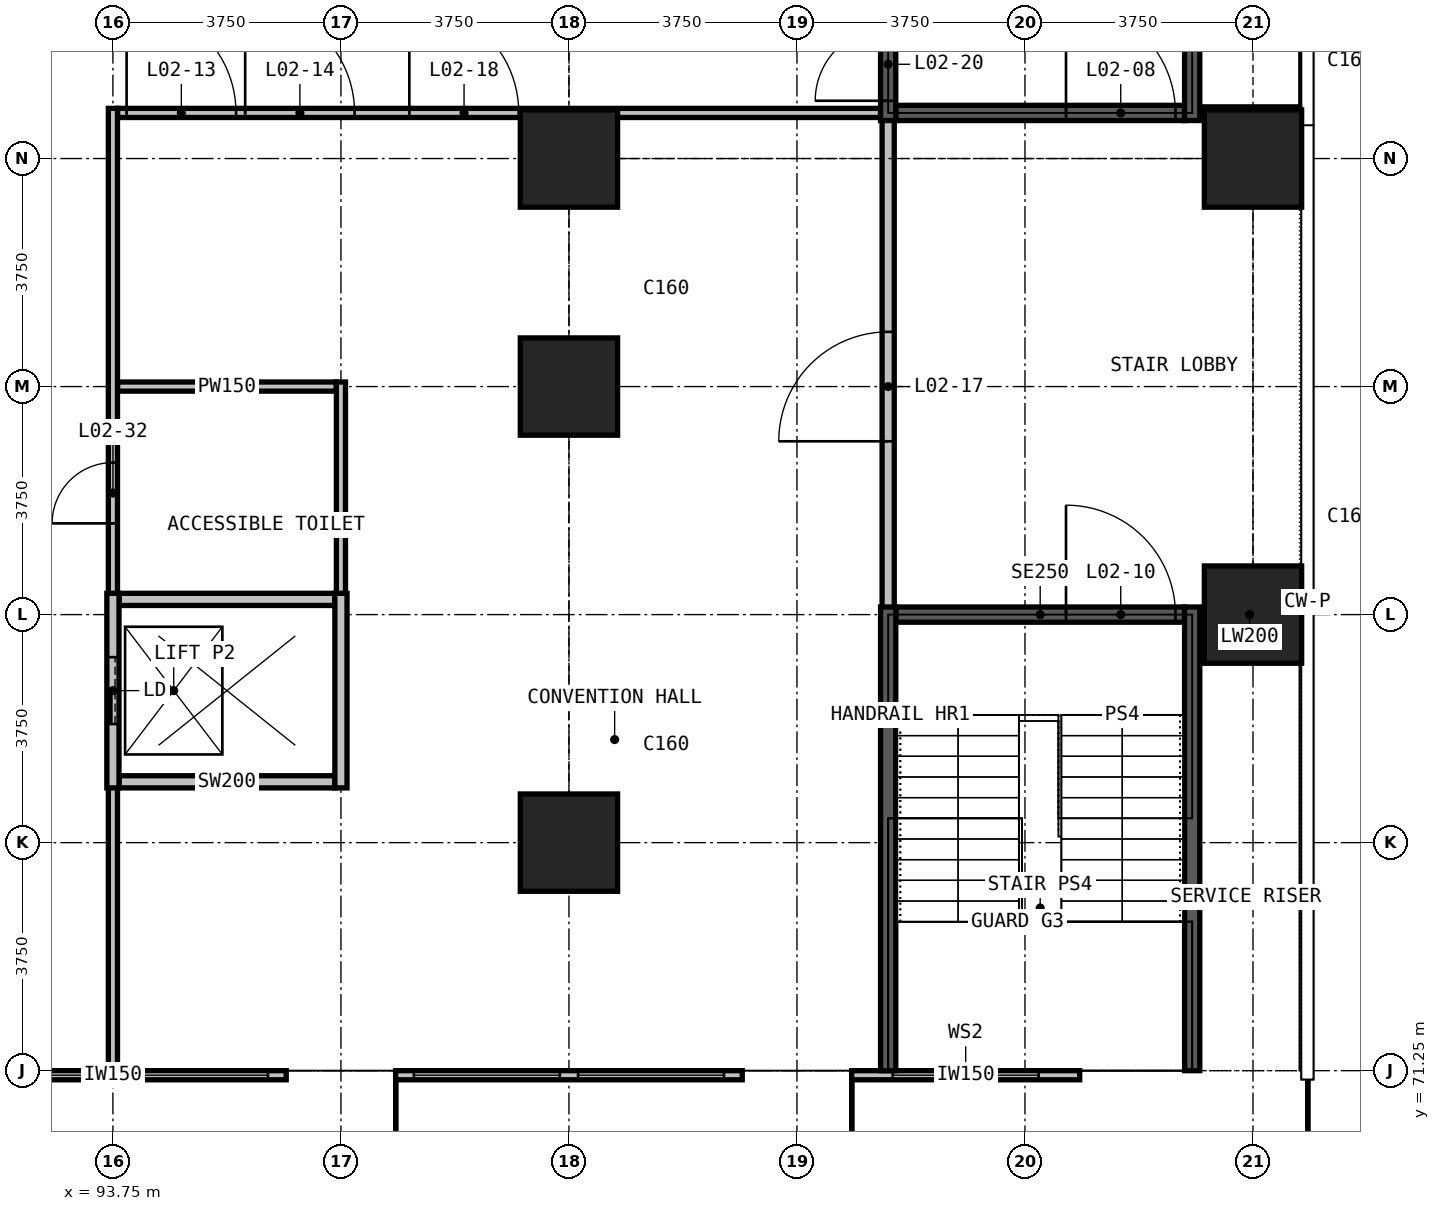
"""IFC4 building model, lengths in metres.
Left out: names, types, materials, properties, quantities, classifications, styles, units other than length and angle.
Written with IfcOpenShell. Run it as: python <this file> out.ifc"""

import sys

from ifc_helpers import new_model, si_unit, direction, frame, frame_2d, origin, origin_2d, place, context, subcontext, project, spatial, polyline, rectangle, outline, extrude, element, fill, save


model = new_model("IFC4")
c1 = context("Model", 3, precision=1e-05, world=origin(), true_north=direction((0.0, 1.0)))
c2 = subcontext(c1, "Body", "Model", "MODEL_VIEW")
j1 = project(units=[si_unit("LENGTHUNIT", "METRE"), si_unit("PLANEANGLEUNIT", "RADIAN")], contexts=[c1])
p1 = place(None, origin())
s1 = spatial("IfcSite", under=j1, at=p1, CompositionType="ELEMENT")
p2 = place(p1, origin())
s2 = spatial("IfcBuilding", under=s1, at=p2, CompositionType="ELEMENT")
p3 = place(p2, frame((0.0, 0.0, 16.5)))
s3 = spatial("IfcBuildingStorey", under=s2, at=p3, CompositionType="ELEMENT", Elevation=16.5)
for number, where, z_axis, x_axis in (
    (1, (98.4, 62.22, 0.0), (1.0, 0.0, 0.0), (0.0, 1.0, 0.0)),
    (2, (105.9, 62.22, 0.0), (1.0, 0.0, 0.0), (0.0, 1.0, 0.0)),
):
    element("IfcWall", number, at=place(p3, frame(where, z_axis=z_axis, x_axis=x_axis)), inside=s3, PredefinedType="SHEAR", context=c2, shape_type="SweptSolid", body=[
        extrude(outline(polyline([(0.0, 0.0), (9.03, 0.0), (9.03, 7.5), (5.28, 7.5), (5.28, 7.15), (-17.22, 7.15), (-17.22, 7.5), (-20.97, 7.5), (-20.97, 0.0), (-11.941, 0.0), (-11.595, 0.488), (-10.658, 1.607), (-9.72, 2.522), (-8.783, 3.234), (-7.845, 3.743), (-6.908, 4.048), (-5.97, 4.15), (-5.033, 4.048), (-4.095, 3.743), (-3.158, 3.234), (-2.22, 2.522), (-1.283, 1.607), (-0.345, 0.488), (0.0, 0.0)])), origin(), (0.0, 0.0, -1.0), 1.8),
    ])
p4 = place(p3, frame((113.4, 62.22, 0.0), z_axis=(1.0, 0.0, 0.0), x_axis=(0.0, 1.0, 0.0)))
e3 = element("IfcWall", 3, at=p4, inside=s3, PredefinedType="SHEAR", context=c2, shape_type="SweptSolid", body=[
    extrude(outline(polyline([(0.0, 0.0), (9.03, 0.0), (9.03, 7.5), (5.28, 7.5), (5.28, 7.15), (-17.22, 7.15), (-17.22, 7.5), (-20.97, 7.5), (-20.97, 0.0), (-11.941, 0.0), (-11.595, 0.488), (-10.658, 1.607), (-9.72, 2.522), (-8.783, 3.234), (-7.845, 3.743), (-6.908, 4.048), (-5.97, 4.15), (-5.033, 4.048), (-4.095, 3.743), (-3.158, 3.234), (-2.22, 2.522), (-1.283, 1.607), (-0.345, 0.488), (0.0, 0.0)])), origin(), (0.0, 0.0, -1.0), 3.75),
])
for number, where, z_axis, x_axis in (
    (4, (101.25, 75.0, 0.0), (0.0, 0.0, 1.0), (1.0, 0.0, 0.0)),
    (5, (101.25, 82.5, 0.0), (0.0, 0.0, 1.0), (1.0, 0.0, 0.0)),
    (6, (101.25, 86.25, 0.0), (0.0, 0.0, 1.0), (1.0, 0.0, 0.0)),
    (7, (112.5, 78.75, 0.0), (0.0, 0.0, 1.0), (1.0, 0.0, 0.0)),
    (8, (112.5, 86.25, 0.0), (0.0, 0.0, 1.0), (1.0, 0.0, 0.0)),
):
    element("IfcColumn", number, at=place(p3, frame(where, z_axis=z_axis, x_axis=x_axis)), inside=s3, PredefinedType="COLUMN", context=c2, shape_type="SweptSolid", body=[
        extrude(rectangle(XDim=1.6, YDim=1.6, at=origin_2d()), origin(), (0.0, 0.0, 1.0), 7.5),
    ])
p5 = place(p3, frame((90.9, 71.175, 0.0), z_axis=(0.0, 0.0, 1.0), x_axis=(1.0, 0.0, 0.0)))
e9 = element("IfcWall", 9, at=p5, inside=s3, PredefinedType="SOLIDWALL", context=c2, shape_type="SweptSolid", body=[
    extrude(rectangle(XDim=5.7, YDim=0.15, at=frame_2d((2.85, 0.0))), origin(), (0.0, 0.0, 1.0), 7.15),
])
p6 = place(p5, frame((0.3, 0.0, 0.9)))
e10 = element("IfcOpeningElement", 10, at=p6, cuts=e9, PredefinedType="OPENING", context=c2, shape_type="SweptSolid", body=[
    extrude(rectangle(XDim=2.4, YDim=3.6, at=frame_2d((1.2, 1.8))), frame((0.0, 0.085, 0.0), z_axis=(0.0, -1.0, 0.0), x_axis=(1.0, 0.0, 0.0)), (0.0, 0.0, 1.0), 0.17),
])
p7 = place(p5, frame((3.0, 0.0, 0.9)))
e11 = element("IfcOpeningElement", 11, at=p7, cuts=e9, PredefinedType="OPENING", context=c2, shape_type="SweptSolid", body=[
    extrude(rectangle(XDim=2.4, YDim=3.6, at=frame_2d((1.2, 1.8))), frame((0.0, 0.085, 0.0), z_axis=(0.0, -1.0, 0.0), x_axis=(1.0, 0.0, 0.0)), (0.0, 0.0, 1.0), 0.17),
])
p8 = place(p3, frame((98.4, 71.175, 0.0), z_axis=(0.0, 0.0, 1.0), x_axis=(1.0, 0.0, 0.0)))
e12 = element("IfcWall", 12, at=p8, inside=s3, PredefinedType="SOLIDWALL", context=c2, shape_type="SweptSolid", body=[
    extrude(rectangle(XDim=5.7, YDim=0.15, at=frame_2d((2.85, 0.0))), origin(), (0.0, 0.0, 1.0), 7.15),
])
p9 = place(p8, frame((0.3, 0.0, 0.9)))
e13 = element("IfcOpeningElement", 13, at=p9, cuts=e12, PredefinedType="OPENING", context=c2, shape_type="SweptSolid", body=[
    extrude(rectangle(XDim=2.4, YDim=3.6, at=frame_2d((1.2, 1.8))), frame((0.0, 0.085, 0.0), z_axis=(0.0, -1.0, 0.0), x_axis=(1.0, 0.0, 0.0)), (0.0, 0.0, 1.0), 0.17),
])
p10 = place(p8, frame((3.0, 0.0, 0.9)))
e14 = element("IfcOpeningElement", 14, at=p10, cuts=e12, PredefinedType="OPENING", context=c2, shape_type="SweptSolid", body=[
    extrude(rectangle(XDim=2.4, YDim=3.6, at=frame_2d((1.2, 1.8))), frame((0.0, 0.085, 0.0), z_axis=(0.0, -1.0, 0.0), x_axis=(1.0, 0.0, 0.0)), (0.0, 0.0, 1.0), 0.17),
])
p11 = place(p3, frame((105.9, 71.175, 0.0), z_axis=(0.0, 0.0, 1.0), x_axis=(1.0, 0.0, 0.0)))
e15 = element("IfcWall", 15, at=p11, inside=s3, PredefinedType="SOLIDWALL", context=c2, shape_type="SweptSolid", body=[
    extrude(rectangle(XDim=3.75, YDim=0.15, at=frame_2d((1.875, 0.0))), origin(), (0.0, 0.0, 1.0), 7.15),
])
p12 = place(p11, frame((0.675, 0.0, 0.9)))
e16 = element("IfcOpeningElement", 16, at=p12, cuts=e15, PredefinedType="OPENING", context=c2, shape_type="SweptSolid", body=[
    extrude(rectangle(XDim=2.4, YDim=3.6, at=frame_2d((1.2, 1.8))), frame((0.0, 0.085, 0.0), z_axis=(0.0, -1.0, 0.0), x_axis=(1.0, 0.0, 0.0)), (0.0, 0.0, 1.0), 0.17),
])
for number, where, z_axis, x_axis in (
    (17, (111.625, 78.75, 0.0), (0.0, 0.0, 1.0), (1.0, 0.0, 0.0)),
    (18, (111.625, 87.0, 0.0), (0.0, 0.0, 1.0), (1.0, 0.0, 0.0)),
):
    element("IfcWall", number, at=place(p3, frame(where, z_axis=z_axis, x_axis=x_axis)), inside=s3, PredefinedType="PARTITIONING", context=c2, shape_type="SweptSolid", body=[
        extrude(rectangle(XDim=1.64, YDim=0.2, at=frame_2d((0.82, 0.0))), origin(), (0.0, 0.0, 1.0), 7.15),
    ])
p13 = place(p3, frame((106.5, 78.625, 0.0), z_axis=(0.0, 0.0, 1.0), x_axis=(0.0, 1.0, 0.0)))
e19 = element("IfcWall", 19, at=p13, inside=s3, PredefinedType="PARTITIONING", context=c2, shape_type="SweptSolid", body=[
    extrude(rectangle(XDim=8.5, YDim=0.2, at=frame_2d((4.25, 0.0))), origin(), (0.0, 0.0, 1.0), 7.15),
])
p14 = place(p13, frame((2.975, 0.0, 0.0)))
e20 = element("IfcOpeningElement", 20, at=p14, cuts=e19, PredefinedType="OPENING", context=c2, shape_type="SweptSolid", body=[
    extrude(rectangle(XDim=1.8, YDim=2.2, at=frame_2d((0.9, 1.1))), frame((0.0, 0.11, 0.0), z_axis=(0.0, -1.0, 0.0), x_axis=(1.0, 0.0, 0.0)), (0.0, 0.0, 1.0), 0.22),
])
p15 = place(p3, frame((93.825, 82.5, 0.0), z_axis=(0.0, 0.0, 1.0), x_axis=(1.0, 0.0, 0.0)))
e21 = element("IfcWall", 21, at=p15, inside=s3, PredefinedType="PARTITIONING", context=c2, shape_type="SweptSolid", body=[
    extrude(rectangle(XDim=3.6, YDim=0.15, at=frame_2d((1.8, 0.0))), origin(), (0.0, 0.0, 1.0), 7.15),
])
p16 = place(p3, frame((93.825, 87.0, 0.0), z_axis=(0.0, 0.0, 1.0), x_axis=(1.0, 0.0, 0.0)))
e22 = element("IfcWall", 22, at=p16, inside=s3, PredefinedType="PARTITIONING", context=c2, shape_type="SweptSolid", body=[
    extrude(rectangle(XDim=12.55, YDim=0.15, at=frame_2d((6.275, 0.0))), origin(), (0.0, 0.0, 1.0), 7.15),
])
p17 = place(p16, frame((0.15, 0.0, 0.0)))
e23 = element("IfcOpeningElement", 23, at=p17, cuts=e22, PredefinedType="OPENING", context=c2, shape_type="SweptSolid", body=[
    extrude(rectangle(XDim=1.8, YDim=2.2, at=frame_2d((0.9, 1.1))), frame((0.0, 0.085, 0.0), z_axis=(0.0, -1.0, 0.0), x_axis=(1.0, 0.0, 0.0)), (0.0, 0.0, 1.0), 0.17),
])
p18 = place(p16, frame((2.1, 0.0, 0.0)))
e24 = element("IfcOpeningElement", 24, at=p18, cuts=e22, PredefinedType="OPENING", context=c2, shape_type="SweptSolid", body=[
    extrude(rectangle(XDim=1.8, YDim=2.2, at=frame_2d((0.9, 1.1))), frame((0.0, 0.085, 0.0), z_axis=(0.0, -1.0, 0.0), x_axis=(1.0, 0.0, 0.0)), (0.0, 0.0, 1.0), 0.17),
])
p19 = place(p16, frame((4.8, 0.0, 0.0)))
e25 = element("IfcOpeningElement", 25, at=p19, cuts=e22, PredefinedType="OPENING", context=c2, shape_type="SweptSolid", body=[
    extrude(rectangle(XDim=1.8, YDim=2.2, at=frame_2d((0.9, 1.1))), frame((0.0, 0.085, 0.0), z_axis=(0.0, -1.0, 0.0), x_axis=(1.0, 0.0, 0.0)), (0.0, 0.0, 1.0), 0.17),
])
p20 = place(p3, frame((93.75, 71.25, 0.0), z_axis=(0.0, 0.0, 1.0), x_axis=(0.0, 1.0, 0.0)))
e26 = element("IfcWall", 26, at=p20, inside=s3, PredefinedType="PARTITIONING", context=c2, shape_type="SweptSolid", body=[
    extrude(rectangle(XDim=4.85, YDim=0.15, at=frame_2d((2.425, 0.0))), origin(), (0.0, 0.0, 1.0), 7.15),
])
p21 = place(p3, frame((93.75, 78.9, 0.0), z_axis=(0.0, 0.0, 1.0), x_axis=(0.0, 1.0, 0.0)))
e27 = element("IfcWall", 27, at=p21, inside=s3, PredefinedType="PARTITIONING", context=c2, shape_type="SweptSolid", body=[
    extrude(rectangle(XDim=8.175, YDim=0.15, at=frame_2d((4.087, 0.0))), origin(), (0.0, 0.0, 1.0), 7.15),
])
p22 = place(p21, frame((1.35, 0.0, 0.0)))
e28 = element("IfcOpeningElement", 28, at=p22, cuts=e27, PredefinedType="OPENING", context=c2, shape_type="SweptSolid", body=[
    extrude(rectangle(XDim=1.0, YDim=2.2, at=frame_2d((0.5, 1.1))), frame((0.0, 0.085, 0.0), z_axis=(0.0, -1.0, 0.0), x_axis=(1.0, 0.0, 0.0)), (0.0, 0.0, 1.0), 0.17),
])
p23 = place(p3, frame((97.5, 78.9, 0.0), z_axis=(0.0, 0.0, 1.0), x_axis=(0.0, 1.0, 0.0)))
e29 = element("IfcWall", 29, at=p23, inside=s3, PredefinedType="PARTITIONING", context=c2, shape_type="SweptSolid", body=[
    extrude(rectangle(XDim=3.675, YDim=0.15, at=frame_2d((1.837, 0.0))), origin(), (0.0, 0.0, 1.0), 7.15),
])
for number, where, z_axis, x_axis in (
    (30, (93.85, 76.0, 0.0), (0.0, 0.0, 1.0), (1.0, 0.0, 0.0)),
    (31, (93.85, 79.0, 0.0), (0.0, 0.0, 1.0), (1.0, 0.0, 0.0)),
):
    element("IfcWall", number, at=place(p3, frame(where, z_axis=z_axis, x_axis=x_axis)), inside=s3, PredefinedType="PARTITIONING", context=c2, shape_type="SweptSolid", body=[
        extrude(rectangle(XDim=3.55, YDim=0.2, at=frame_2d((1.775, 0.0))), origin(), (0.0, 0.0, 1.0), 7.15),
    ])
p24 = place(p3, frame((93.75, 75.9, 0.0), z_axis=(0.0, 0.0, 1.0), x_axis=(0.0, 1.0, 0.0)))
e32 = element("IfcWall", 32, at=p24, inside=s3, PredefinedType="PARTITIONING", context=c2, shape_type="SweptSolid", body=[
    extrude(rectangle(XDim=3.2, YDim=0.2, at=frame_2d((1.6, 0.0))), origin(), (0.0, 0.0, 1.0), 7.15),
])
p25 = place(p24, frame((1.05, 0.0, 0.0)))
e33 = element("IfcOpeningElement", 33, at=p25, cuts=e32, PredefinedType="OPENING", context=c2, shape_type="SweptSolid", body=[
    extrude(rectangle(XDim=1.1, YDim=2.2, at=frame_2d((0.55, 1.1))), frame((0.0, 0.11, 0.0), z_axis=(0.0, -1.0, 0.0), x_axis=(1.0, 0.0, 0.0)), (0.0, 0.0, 1.0), 0.22),
])
p26 = place(p3, frame((97.5, 75.9, 0.0), z_axis=(0.0, 0.0, 1.0), x_axis=(0.0, 1.0, 0.0)))
e34 = element("IfcWall", 34, at=p26, inside=s3, PredefinedType="PARTITIONING", context=c2, shape_type="SweptSolid", body=[
    extrude(rectangle(XDim=3.2, YDim=0.2, at=frame_2d((1.6, 0.0))), origin(), (0.0, 0.0, 1.0), 7.15),
])
p27 = place(p3, frame((106.625, 78.75, 0.0), z_axis=(0.0, 0.0, 1.0), x_axis=(1.0, 0.0, 0.0)))
e35 = element("IfcWall", 35, at=p27, inside=s3, PredefinedType="PARTITIONING", context=c2, shape_type="SweptSolid", body=[
    extrude(rectangle(XDim=4.75, YDim=0.25, at=frame_2d((2.375, 0.0))), origin(), (0.0, 0.0, 1.0), 7.15),
])
p28 = place(p27, frame((2.8, 0.0, 0.0)))
e36 = element("IfcOpeningElement", 36, at=p28, cuts=e35, PredefinedType="OPENING", context=c2, shape_type="SweptSolid", body=[
    extrude(rectangle(XDim=1.8, YDim=2.2, at=frame_2d((0.9, 1.1))), frame((0.0, 0.135, 0.0), z_axis=(0.0, -1.0, 0.0), x_axis=(1.0, 0.0, 0.0)), (0.0, 0.0, 1.0), 0.27),
])
p29 = place(p3, frame((106.625, 87.0, 0.0), z_axis=(0.0, 0.0, 1.0), x_axis=(1.0, 0.0, 0.0)))
e37 = element("IfcWall", 37, at=p29, inside=s3, PredefinedType="PARTITIONING", context=c2, shape_type="SweptSolid", body=[
    extrude(rectangle(XDim=4.75, YDim=0.25, at=frame_2d((2.375, 0.0))), origin(), (0.0, 0.0, 1.0), 7.15),
])
p30 = place(p29, frame((2.8, 0.0, 0.0)))
e38 = element("IfcOpeningElement", 38, at=p30, cuts=e37, PredefinedType="OPENING", context=c2, shape_type="SweptSolid", body=[
    extrude(rectangle(XDim=1.8, YDim=2.2, at=frame_2d((0.9, 1.1))), frame((0.0, 0.135, 0.0), z_axis=(0.0, -1.0, 0.0), x_axis=(1.0, 0.0, 0.0)), (0.0, 0.0, 1.0), 0.27),
])
p31 = place(p3, frame((106.5, 71.25, 0.0), z_axis=(0.0, 0.0, 1.0), x_axis=(0.0, 1.0, 0.0)))
e39 = element("IfcWall", 39, at=p31, inside=s3, PredefinedType="PARTITIONING", context=c2, shape_type="SweptSolid", body=[
    extrude(rectangle(XDim=7.625, YDim=0.25, at=frame_2d((3.812, 0.0))), origin(), (0.0, 0.0, 1.0), 7.15),
])
p32 = place(p3, frame((106.5, 86.875, 0.0), z_axis=(0.0, 0.0, 1.0), x_axis=(0.0, 1.0, 0.0)))
e40 = element("IfcWall", 40, at=p32, inside=s3, PredefinedType="PARTITIONING", context=c2, shape_type="SweptSolid", body=[
    extrude(rectangle(XDim=7.625, YDim=0.25, at=frame_2d((3.812, 0.0))), origin(), (0.0, 0.0, 1.0), 7.15),
])
p33 = place(p32, frame((0.325, 0.0, 0.0)))
e41 = element("IfcOpeningElement", 41, at=p33, cuts=e40, PredefinedType="OPENING", context=c2, shape_type="SweptSolid", body=[
    extrude(rectangle(XDim=1.2, YDim=2.2, at=frame_2d((0.6, 1.1))), frame((0.0, 0.135, 0.0), z_axis=(0.0, -1.0, 0.0), x_axis=(1.0, 0.0, 0.0)), (0.0, 0.0, 1.0), 0.27),
])
for number, where, z_axis, x_axis in (
    (42, (111.5, 71.25, 0.0), (0.0, 0.0, 1.0), (0.0, 1.0, 0.0)),
    (43, (111.5, 86.875, 0.0), (0.0, 0.0, 1.0), (0.0, 1.0, 0.0)),
):
    element("IfcWall", number, at=place(p3, frame(where, z_axis=z_axis, x_axis=x_axis)), inside=s3, PredefinedType="PARTITIONING", context=c2, shape_type="SweptSolid", body=[
        extrude(rectangle(XDim=7.625, YDim=0.25, at=frame_2d((3.812, 0.0))), origin(), (0.0, 0.0, 1.0), 7.15),
    ])
p34 = place(p6, origin())
e44 = element("IfcWindow", 44, at=p34, inside=s3, PartitioningType="SINGLE_PANEL", PredefinedType="WINDOW", context=c2, shape_type="SweptSolid", body=[
    extrude(rectangle(XDim=2.4, YDim=3.6, at=frame_2d((1.2, 1.8))), frame((0.0, 0.03, 0.0), z_axis=(0.0, -1.0, 0.0), x_axis=(1.0, 0.0, 0.0)), (0.0, 0.0, 1.0), 0.06),
])
fill(e10, e44)
p35 = place(p7, origin())
e45 = element("IfcWindow", 45, at=p35, inside=s3, PartitioningType="SINGLE_PANEL", PredefinedType="WINDOW", context=c2, shape_type="SweptSolid", body=[
    extrude(rectangle(XDim=2.4, YDim=3.6, at=frame_2d((1.2, 1.8))), frame((0.0, 0.03, 0.0), z_axis=(0.0, -1.0, 0.0), x_axis=(1.0, 0.0, 0.0)), (0.0, 0.0, 1.0), 0.06),
])
fill(e11, e45)
p36 = place(p9, origin())
e46 = element("IfcWindow", 46, at=p36, inside=s3, PartitioningType="SINGLE_PANEL", PredefinedType="WINDOW", context=c2, shape_type="SweptSolid", body=[
    extrude(rectangle(XDim=2.4, YDim=3.6, at=frame_2d((1.2, 1.8))), frame((0.0, 0.03, 0.0), z_axis=(0.0, -1.0, 0.0), x_axis=(1.0, 0.0, 0.0)), (0.0, 0.0, 1.0), 0.06),
])
fill(e13, e46)
p37 = place(p10, origin())
e47 = element("IfcWindow", 47, at=p37, inside=s3, PartitioningType="SINGLE_PANEL", PredefinedType="WINDOW", context=c2, shape_type="SweptSolid", body=[
    extrude(rectangle(XDim=2.4, YDim=3.6, at=frame_2d((1.2, 1.8))), frame((0.0, 0.03, 0.0), z_axis=(0.0, -1.0, 0.0), x_axis=(1.0, 0.0, 0.0)), (0.0, 0.0, 1.0), 0.06),
])
fill(e14, e47)
p38 = place(p12, origin())
e48 = element("IfcWindow", 48, at=p38, inside=s3, PartitioningType="SINGLE_PANEL", PredefinedType="WINDOW", context=c2, shape_type="SweptSolid", body=[
    extrude(rectangle(XDim=2.4, YDim=3.6, at=frame_2d((1.2, 1.8))), frame((0.0, 0.03, 0.0), z_axis=(0.0, -1.0, 0.0), x_axis=(1.0, 0.0, 0.0)), (0.0, 0.0, 1.0), 0.06),
])
fill(e16, e48)
p39 = place(p30, origin())
e49 = element("IfcDoor", 49, at=p39, inside=s3, OperationType="DOUBLE_DOOR_SINGLE_SWING", PredefinedType="DOOR", context=c2, shape_type="SweptSolid", body=[
    extrude(rectangle(XDim=1.8, YDim=2.2, at=frame_2d((0.9, 1.1))), frame((0.0, 0.025, 0.0), z_axis=(0.0, -1.0, 0.0), x_axis=(1.0, 0.0, 0.0)), (0.0, 0.0, 1.0), 0.05),
])
fill(e38, e49)
p40 = place(p28, origin())
e50 = element("IfcDoor", 50, at=p40, inside=s3, OperationType="DOUBLE_DOOR_SINGLE_SWING", PredefinedType="DOOR", context=c2, shape_type="SweptSolid", body=[
    extrude(rectangle(XDim=1.8, YDim=2.2, at=frame_2d((0.9, 1.1))), frame((0.0, 0.025, 0.0), z_axis=(0.0, -1.0, 0.0), x_axis=(1.0, 0.0, 0.0)), (0.0, 0.0, 1.0), 0.05),
])
fill(e36, e50)
p41 = place(p25, origin())
e51 = element("IfcDoor", 51, at=p41, inside=s3, OperationType="DOUBLE_DOOR_SLIDING", PredefinedType="DOOR", context=c2, shape_type="SweptSolid", body=[
    extrude(rectangle(XDim=1.1, YDim=2.2, at=frame_2d((0.55, 1.1))), frame((0.0, 0.025, 0.0), z_axis=(0.0, -1.0, 0.0), x_axis=(1.0, 0.0, 0.0)), (0.0, 0.0, 1.0), 0.05),
])
fill(e33, e51)
p42 = place(p17, origin())
e52 = element("IfcDoor", 52, at=p42, inside=s3, OperationType="DOUBLE_DOOR_SINGLE_SWING", PredefinedType="DOOR", context=c2, shape_type="SweptSolid", body=[
    extrude(rectangle(XDim=1.8, YDim=2.2, at=frame_2d((0.9, 1.1))), frame((0.0, 0.025, 0.0), z_axis=(0.0, -1.0, 0.0), x_axis=(1.0, 0.0, 0.0)), (0.0, 0.0, 1.0), 0.05),
])
fill(e23, e52)
p43 = place(p18, origin())
e53 = element("IfcDoor", 53, at=p43, inside=s3, OperationType="DOUBLE_DOOR_SINGLE_SWING", PredefinedType="DOOR", context=c2, shape_type="SweptSolid", body=[
    extrude(rectangle(XDim=1.8, YDim=2.2, at=frame_2d((0.9, 1.1))), frame((0.0, 0.025, 0.0), z_axis=(0.0, -1.0, 0.0), x_axis=(1.0, 0.0, 0.0)), (0.0, 0.0, 1.0), 0.05),
])
fill(e24, e53)
p44 = place(p14, origin())
e54 = element("IfcDoor", 54, at=p44, inside=s3, OperationType="DOUBLE_DOOR_SINGLE_SWING", PredefinedType="DOOR", context=c2, shape_type="SweptSolid", body=[
    extrude(rectangle(XDim=1.8, YDim=2.2, at=frame_2d((0.9, 1.1))), frame((0.0, 0.025, 0.0), z_axis=(0.0, -1.0, 0.0), x_axis=(1.0, 0.0, 0.0)), (0.0, 0.0, 1.0), 0.05),
])
fill(e20, e54)
p45 = place(p19, origin())
e55 = element("IfcDoor", 55, at=p45, inside=s3, OperationType="DOUBLE_DOOR_SINGLE_SWING", PredefinedType="DOOR", context=c2, shape_type="SweptSolid", body=[
    extrude(rectangle(XDim=1.8, YDim=2.2, at=frame_2d((0.9, 1.1))), frame((0.0, 0.025, 0.0), z_axis=(0.0, -1.0, 0.0), x_axis=(1.0, 0.0, 0.0)), (0.0, 0.0, 1.0), 0.05),
])
fill(e25, e55)
p46 = place(p33, origin())
e56 = element("IfcDoor", 56, at=p46, inside=s3, OperationType="SINGLE_SWING_LEFT", PredefinedType="DOOR", context=c2, shape_type="SweptSolid", body=[
    extrude(rectangle(XDim=1.2, YDim=2.2, at=frame_2d((0.6, 1.1))), frame((0.0, 0.025, 0.0), z_axis=(0.0, -1.0, 0.0), x_axis=(1.0, 0.0, 0.0)), (0.0, 0.0, 1.0), 0.05),
])
fill(e41, e56)
p47 = place(p22, origin())
e57 = element("IfcDoor", 57, at=p47, inside=s3, OperationType="SINGLE_SWING_LEFT", PredefinedType="DOOR", context=c2, shape_type="SweptSolid", body=[
    extrude(rectangle(XDim=1.0, YDim=2.2, at=frame_2d((0.5, 1.1))), frame((0.0, 0.025, 0.0), z_axis=(0.0, -1.0, 0.0), x_axis=(1.0, 0.0, 0.0)), (0.0, 0.0, 1.0), 0.05),
])
fill(e28, e57)
save(model, sys.argv[1])
